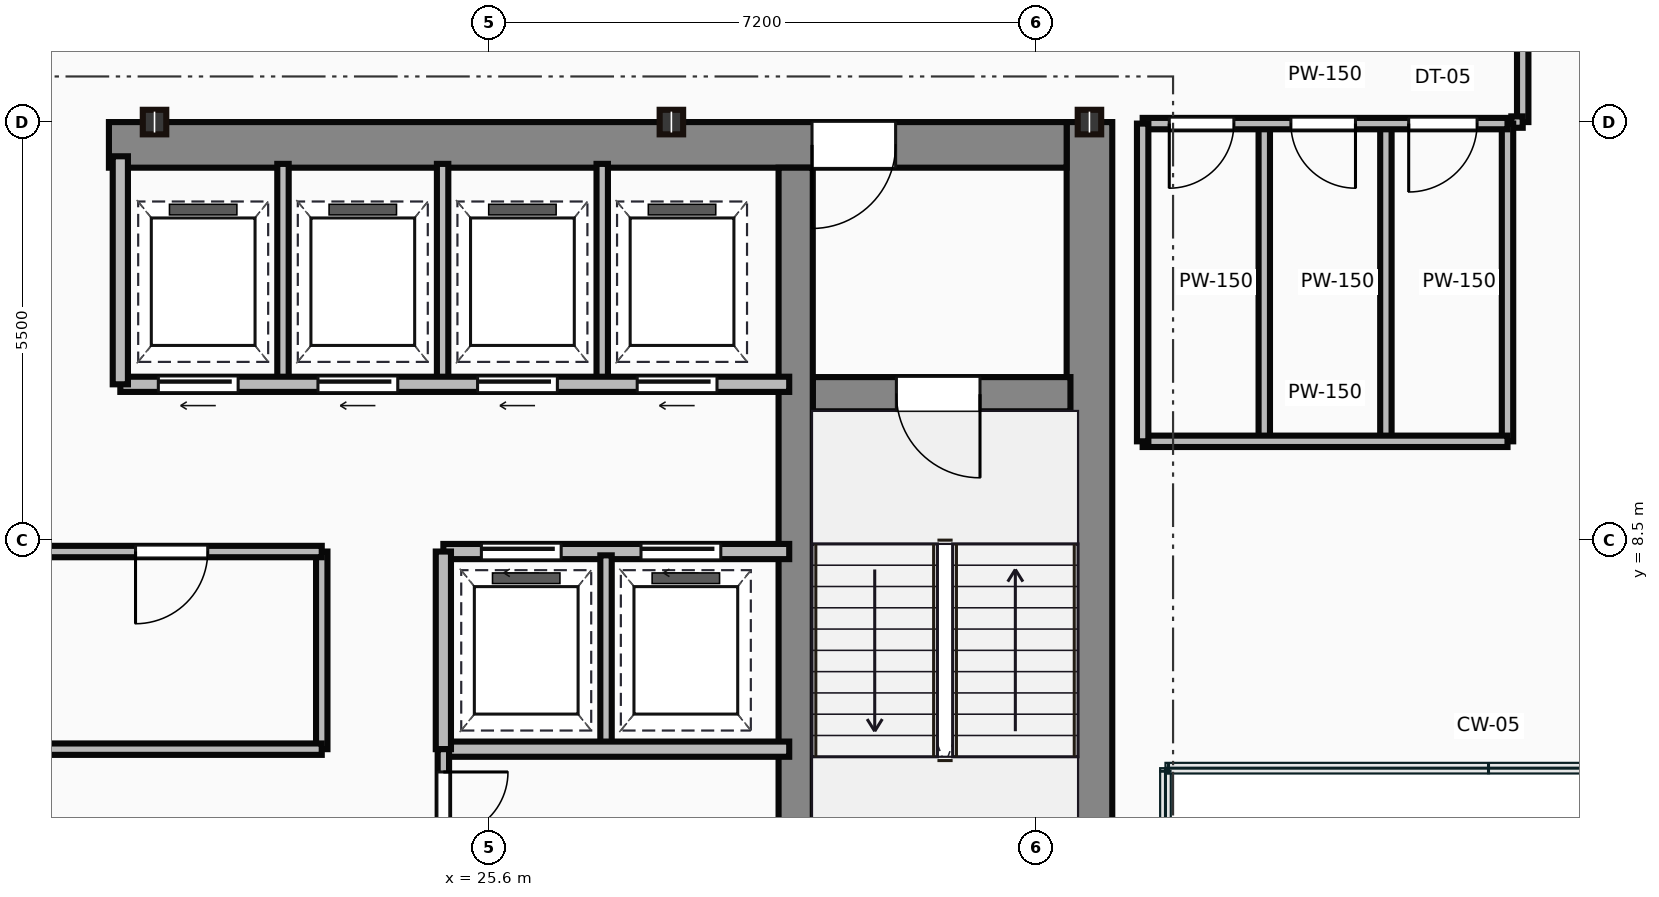
"""IFC4 building model, lengths in metres.
Left out: names, types, materials, properties, quantities, classifications, styles, units other than length and angle.
Written with IfcOpenShell. Run it as: python <this file> out.ifc"""

import sys

from ifc_helpers import new_model, si_unit, direction, frame, frame_2d, origin, origin_2d, place, context, subcontext, project, spatial, rectangle, i_section, extrude, source, transform, mapped, element, fill, save


model = new_model("IFC4")
c1 = context("Model", 3, precision=1e-05, world=origin(), true_north=direction((0.0, 1.0)))
c2 = subcontext(c1, "Body", "Model", "MODEL_VIEW")
j1 = project(units=[si_unit("LENGTHUNIT", "METRE"), si_unit("PLANEANGLEUNIT", "RADIAN")], contexts=[c1])
p1 = place(None, origin())
s1 = spatial("IfcSite", under=j1, at=p1, CompositionType="ELEMENT")
p2 = place(p1, origin())
s2 = spatial("IfcBuilding", under=s1, at=p2, CompositionType="ELEMENT")
p3 = place(p2, frame((0.0, 0.0, 228.75)))
s3 = spatial("IfcBuildingStorey", under=s2, at=p3, CompositionType="ELEMENT", Elevation=228.75)
m1 = source(origin(), c2, "Body", "SweptSolid", [
    extrude(rectangle(XDim=13.1, YDim=0.6, at=frame_2d((6.55, 0.0))), origin(), (0.0, 0.0, 1.0), 3.65),
])
p4 = place(p3, frame((33.5, 0.9, 0.0), z_axis=(0.0, 0.0, 1.0), x_axis=(0.0, 1.0, 0.0)))
e1 = element("IfcWall", 1, at=p4, inside=s3, PredefinedType="SHEAR", context=c2, shape_type="MappedRepresentation", body=[
    mapped(m1, transform((0.0, 0.0, 0.0))),
])
m2 = source(origin(), c2, "Body", "SweptSolid", [
    extrude(rectangle(XDim=12.6, YDim=0.6, at=frame_2d((6.3, 0.0))), origin(), (0.0, 0.0, 1.0), 3.65),
])
p5 = place(p3, frame((20.6, 13.7, 0.0), z_axis=(0.0, 0.0, 1.0), x_axis=(1.0, 0.0, 0.0)))
e2 = element("IfcWall", 2, at=p5, inside=s3, PredefinedType="SHEAR", context=c2, shape_type="MappedRepresentation", body=[
    mapped(m2, transform((0.0, 0.0, 0.0))),
])
p6 = place(p5, frame((9.25, 0.0, 0.0)))
e3 = element("IfcOpeningElement", 3, at=p6, cuts=e2, PredefinedType="OPENING", context=c2, shape_type="SweptSolid", body=[
    extrude(rectangle(XDim=1.1, YDim=2.15, at=frame_2d((0.55, 1.075))), frame((0.0, 0.31, 0.0), z_axis=(0.0, -1.0, 0.0), x_axis=(1.0, 0.0, 0.0)), (0.0, 0.0, 1.0), 0.62),
])
m3 = source(origin(), c2, "Body", "SweptSolid", [
    extrude(rectangle(XDim=12.5, YDim=0.45, at=frame_2d((6.25, 0.0))), origin(), (0.0, 0.0, 1.0), 3.65),
])
p7 = place(p3, frame((29.635, 0.9, 0.0), z_axis=(0.0, 0.0, 1.0), x_axis=(0.0, 1.0, 0.0)))
e4 = element("IfcWall", 4, at=p7, inside=s3, PredefinedType="SHEAR", context=c2, shape_type="MappedRepresentation", body=[
    mapped(m3, transform((0.0, 0.0, 0.0))),
])
m4 = source(origin(), c2, "Body", "SweptSolid", [
    extrude(rectangle(XDim=3.39, YDim=0.45, at=frame_2d((1.695, 0.0))), origin(), (0.0, 0.0, 1.0), 3.65),
])
p8 = place(p3, frame((29.86, 10.42, 0.0), z_axis=(0.0, 0.0, 1.0), x_axis=(1.0, 0.0, 0.0)))
e5 = element("IfcWall", 5, at=p8, inside=s3, PredefinedType="SHEAR", context=c2, shape_type="MappedRepresentation", body=[
    mapped(m4, transform((0.0, 0.0, 0.0))),
])
p9 = place(p8, frame((1.1, 0.0, 0.0)))
e6 = element("IfcOpeningElement", 6, at=p9, cuts=e5, PredefinedType="OPENING", context=c2, shape_type="SweptSolid", body=[
    extrude(rectangle(XDim=1.1, YDim=2.15, at=frame_2d((0.55, 1.075))), frame((0.0, 0.235, 0.0), z_axis=(0.0, -1.0, 0.0), x_axis=(1.0, 0.0, 0.0)), (0.0, 0.0, 1.0), 0.47),
])
m5 = source(origin(), c2, "Body", "SweptSolid", [
    extrude(i_section(OverallWidth=0.309, OverallDepth=0.323, WebThickness=0.014, FlangeThickness=0.023, at=origin_2d()), origin(), (0.0, 0.0, 1.0), 3.65),
])
for number, where, z_axis, x_axis in (
    (7, (21.2, 14.0, 0.0), (0.0, 0.0, 1.0), (1.0, 0.0, 0.0)),
    (8, (28.0, 14.0, 0.0), (0.0, 0.0, 1.0), (1.0, 0.0, 0.0)),
    (9, (33.5, 14.0, 0.0), (0.0, 0.0, 1.0), (1.0, 0.0, 0.0)),
):
    element("IfcColumn", number, at=place(p3, frame(where, z_axis=z_axis, x_axis=x_axis)), inside=s3, PredefinedType="COLUMN", context=c2, shape_type="MappedRepresentation", body=[
        mapped(m5, transform((0.0, 0.0, 0.0))),
    ])
m6 = source(origin(), c2, "Body", "SweptSolid", [
    extrude(rectangle(XDim=11.85, YDim=0.15, at=frame_2d((5.925, 0.0))), origin(), (0.0, 0.0, 1.0), 3.4),
])
p10 = place(p3, frame((11.55, 5.75, 0.0), z_axis=(0.0, 0.0, 1.0), x_axis=(1.0, 0.0, 0.0)))
e10 = element("IfcWall", 10, at=p10, inside=s3, PredefinedType="PARTITIONING", context=c2, shape_type="MappedRepresentation", body=[
    mapped(m6, transform((0.0, 0.0, 0.0))),
])
p11 = place(p3, frame((11.55, 8.35, 0.0), z_axis=(0.0, 0.0, 1.0), x_axis=(1.0, 0.0, 0.0)))
e11 = element("IfcWall", 11, at=p11, inside=s3, PredefinedType="PARTITIONING", context=c2, shape_type="MappedRepresentation", body=[
    mapped(m6, transform((0.0, 0.0, 0.0))),
])
p12 = place(p11, frame((1.1, 0.0, 0.0)))
e12 = element("IfcOpeningElement", 12, at=p12, cuts=e11, PredefinedType="OPENING", context=c2, shape_type="SweptSolid", body=[
    extrude(rectangle(XDim=0.95, YDim=2.15, at=frame_2d((0.475, 1.075))), frame((0.0, 0.085, 0.0), z_axis=(0.0, -1.0, 0.0), x_axis=(1.0, 0.0, 0.0)), (0.0, 0.0, 1.0), 0.17),
])
p13 = place(p11, frame((9.4, 0.0, 0.0)))
e13 = element("IfcOpeningElement", 13, at=p13, cuts=e11, PredefinedType="OPENING", context=c2, shape_type="SweptSolid", body=[
    extrude(rectangle(XDim=0.95, YDim=2.15, at=frame_2d((0.475, 1.075))), frame((0.0, 0.085, 0.0), z_axis=(0.0, -1.0, 0.0), x_axis=(1.0, 0.0, 0.0)), (0.0, 0.0, 1.0), 0.17),
])
m7 = source(origin(), c2, "Body", "SweptSolid", [
    extrude(rectangle(XDim=2.6, YDim=0.15, at=frame_2d((1.3, 0.0))), origin(), (0.0, 0.0, 1.0), 3.4),
])
p14 = place(p3, frame((23.4, 5.75, 0.0), z_axis=(0.0, 0.0, 1.0), x_axis=(0.0, 1.0, 0.0)))
e14 = element("IfcWall", 14, at=p14, inside=s3, PredefinedType="PARTITIONING", context=c2, shape_type="MappedRepresentation", body=[
    mapped(m7, transform((0.0, 0.0, 0.0))),
])
m8 = source(origin(), c2, "Body", "SweptSolid", [
    extrude(rectangle(XDim=8.8, YDim=0.2, at=frame_2d((4.4, 0.0))), origin(), (0.0, 0.0, 1.0), 3.4),
])
p15 = place(p3, frame((20.75, 10.55, 0.0), z_axis=(0.0, 0.0, 1.0), x_axis=(1.0, 0.0, 0.0)))
e15 = element("IfcWall", 15, at=p15, inside=s3, PredefinedType="PARTITIONING", context=c2, shape_type="MappedRepresentation", body=[
    mapped(m8, transform((0.0, 0.0, 0.0))),
])
p16 = place(p15, frame((0.5, 0.0, 0.0)))
e16 = element("IfcOpeningElement", 16, at=p16, cuts=e15, PredefinedType="OPENING", context=c2, shape_type="SweptSolid", body=[
    extrude(rectangle(XDim=1.05, YDim=2.15, at=frame_2d((0.525, 1.075))), frame((0.0, 0.11, 0.0), z_axis=(0.0, -1.0, 0.0), x_axis=(1.0, 0.0, 0.0)), (0.0, 0.0, 1.0), 0.22),
])
p17 = place(p15, frame((2.6, 0.0, 0.0)))
e17 = element("IfcOpeningElement", 17, at=p17, cuts=e15, PredefinedType="OPENING", context=c2, shape_type="SweptSolid", body=[
    extrude(rectangle(XDim=1.05, YDim=2.15, at=frame_2d((0.525, 1.075))), frame((0.0, 0.11, 0.0), z_axis=(0.0, -1.0, 0.0), x_axis=(1.0, 0.0, 0.0)), (0.0, 0.0, 1.0), 0.22),
])
p18 = place(p15, frame((4.7, 0.0, 0.0)))
e18 = element("IfcOpeningElement", 18, at=p18, cuts=e15, PredefinedType="OPENING", context=c2, shape_type="SweptSolid", body=[
    extrude(rectangle(XDim=1.05, YDim=2.15, at=frame_2d((0.525, 1.075))), frame((0.0, 0.11, 0.0), z_axis=(0.0, -1.0, 0.0), x_axis=(1.0, 0.0, 0.0)), (0.0, 0.0, 1.0), 0.22),
])
p19 = place(p15, frame((6.8, 0.0, 0.0)))
e19 = element("IfcOpeningElement", 19, at=p19, cuts=e15, PredefinedType="OPENING", context=c2, shape_type="SweptSolid", body=[
    extrude(rectangle(XDim=1.05, YDim=2.15, at=frame_2d((0.525, 1.075))), frame((0.0, 0.11, 0.0), z_axis=(0.0, -1.0, 0.0), x_axis=(1.0, 0.0, 0.0)), (0.0, 0.0, 1.0), 0.22),
])
m9 = source(origin(), c2, "Body", "SweptSolid", [
    extrude(rectangle(XDim=3.0, YDim=0.2, at=frame_2d((1.5, 0.0))), origin(), (0.0, 0.0, 1.0), 3.4),
])
p20 = place(p3, frame((20.75, 10.55, 0.0), z_axis=(0.0, 0.0, 1.0), x_axis=(0.0, 1.0, 0.0)))
e20 = element("IfcWall", 20, at=p20, inside=s3, PredefinedType="PARTITIONING", context=c2, shape_type="MappedRepresentation", body=[
    mapped(m9, transform((0.0, 0.0, 0.0))),
])
m10 = source(origin(), c2, "Body", "SweptSolid", [
    extrude(rectangle(XDim=2.85, YDim=0.15, at=frame_2d((1.425, 0.0))), origin(), (0.0, 0.0, 1.0), 3.4),
])
for number, where, z_axis, x_axis in (
    (21, (22.89, 10.6, 0.0), (0.0, 0.0, 1.0), (0.0, 1.0, 0.0)),
    (22, (24.99, 10.6, 0.0), (0.0, 0.0, 1.0), (0.0, 1.0, 0.0)),
    (23, (27.09, 10.6, 0.0), (0.0, 0.0, 1.0), (0.0, 1.0, 0.0)),
):
    element("IfcWall", number, at=place(p3, frame(where, z_axis=z_axis, x_axis=x_axis)), inside=s3, PredefinedType="PARTITIONING", context=c2, shape_type="MappedRepresentation", body=[
        mapped(m10, transform((0.0, 0.0, 0.0))),
    ])
m11 = source(origin(), c2, "Body", "SweptSolid", [
    extrude(rectangle(XDim=4.55, YDim=0.2, at=frame_2d((2.275, 0.0))), origin(), (0.0, 0.0, 1.0), 3.4),
])
p21 = place(p3, frame((25.0, 8.35, 0.0), z_axis=(0.0, 0.0, 1.0), x_axis=(1.0, 0.0, 0.0)))
e24 = element("IfcWall", 24, at=p21, inside=s3, PredefinedType="PARTITIONING", context=c2, shape_type="MappedRepresentation", body=[
    mapped(m11, transform((0.0, 0.0, 0.0))),
])
p22 = place(p21, frame((0.5, 0.0, 0.0)))
e25 = element("IfcOpeningElement", 25, at=p22, cuts=e24, PredefinedType="OPENING", context=c2, shape_type="SweptSolid", body=[
    extrude(rectangle(XDim=1.05, YDim=2.15, at=frame_2d((0.525, 1.075))), frame((0.0, 0.11, 0.0), z_axis=(0.0, -1.0, 0.0), x_axis=(1.0, 0.0, 0.0)), (0.0, 0.0, 1.0), 0.22),
])
p23 = place(p21, frame((2.6, 0.0, 0.0)))
e26 = element("IfcOpeningElement", 26, at=p23, cuts=e24, PredefinedType="OPENING", context=c2, shape_type="SweptSolid", body=[
    extrude(rectangle(XDim=1.05, YDim=2.15, at=frame_2d((0.525, 1.075))), frame((0.0, 0.11, 0.0), z_axis=(0.0, -1.0, 0.0), x_axis=(1.0, 0.0, 0.0)), (0.0, 0.0, 1.0), 0.22),
])
p24 = place(p3, frame((25.0, 5.75, 0.0), z_axis=(0.0, 0.0, 1.0), x_axis=(1.0, 0.0, 0.0)))
e27 = element("IfcWall", 27, at=p24, inside=s3, PredefinedType="PARTITIONING", context=c2, shape_type="MappedRepresentation", body=[
    mapped(m11, transform((0.0, 0.0, 0.0))),
])
m12 = source(origin(), c2, "Body", "SweptSolid", [
    extrude(rectangle(XDim=2.6, YDim=0.2, at=frame_2d((1.3, 0.0))), origin(), (0.0, 0.0, 1.0), 3.4),
])
p25 = place(p3, frame((25.0, 5.75, 0.0), z_axis=(0.0, 0.0, 1.0), x_axis=(0.0, 1.0, 0.0)))
e28 = element("IfcWall", 28, at=p25, inside=s3, PredefinedType="PARTITIONING", context=c2, shape_type="MappedRepresentation", body=[
    mapped(m12, transform((0.0, 0.0, 0.0))),
])
m13 = source(origin(), c2, "Body", "SweptSolid", [
    extrude(rectangle(XDim=2.5, YDim=0.15, at=frame_2d((1.25, 0.0))), origin(), (0.0, 0.0, 1.0), 3.4),
])
p26 = place(p3, frame((27.14, 5.8, 0.0), z_axis=(0.0, 0.0, 1.0), x_axis=(0.0, 1.0, 0.0)))
e29 = element("IfcWall", 29, at=p26, inside=s3, PredefinedType="PARTITIONING", context=c2, shape_type="MappedRepresentation", body=[
    mapped(m13, transform((0.0, 0.0, 0.0))),
])
m14 = source(origin(), c2, "Body", "SweptSolid", [
    extrude(rectangle(XDim=4.9, YDim=0.15, at=frame_2d((2.45, 0.0))), origin(), (0.0, 0.0, 1.0), 3.4),
])
p27 = place(p3, frame((25.0, 0.85, 0.0), z_axis=(0.0, 0.0, 1.0), x_axis=(0.0, 1.0, 0.0)))
e30 = element("IfcWall", 30, at=p27, inside=s3, PredefinedType="PARTITIONING", context=c2, shape_type="MappedRepresentation", body=[
    mapped(m14, transform((0.0, 0.0, 0.0))),
])
p28 = place(p27, frame((2.0, 0.0, 0.0)))
e31 = element("IfcOpeningElement", 31, at=p28, cuts=e30, PredefinedType="OPENING", context=c2, shape_type="SweptSolid", body=[
    extrude(rectangle(XDim=0.95, YDim=2.15, at=frame_2d((0.475, 1.075))), frame((0.0, 0.085, 0.0), z_axis=(0.0, -1.0, 0.0), x_axis=(1.0, 0.0, 0.0)), (0.0, 0.0, 1.0), 0.17),
])
p29 = place(p27, frame((3.75, 0.0, 0.0)))
e32 = element("IfcOpeningElement", 32, at=p29, cuts=e30, PredefinedType="OPENING", context=c2, shape_type="SweptSolid", body=[
    extrude(rectangle(XDim=0.85, YDim=2.15, at=frame_2d((0.425, 1.075))), frame((0.0, 0.085, 0.0), z_axis=(0.0, -1.0, 0.0), x_axis=(1.0, 0.0, 0.0)), (0.0, 0.0, 1.0), 0.17),
])
m15 = source(origin(), c2, "Body", "SweptSolid", [
    extrude(rectangle(XDim=4.8, YDim=0.15, at=frame_2d((2.4, 0.0))), origin(), (0.0, 0.0, 1.0), 2.787),
])
p30 = place(p3, frame((34.2, 13.98, 0.0), z_axis=(0.0, 0.0, 1.0), x_axis=(1.0, 0.0, 0.0)))
e33 = element("IfcWall", 33, at=p30, inside=s3, PredefinedType="PARTITIONING", context=c2, shape_type="MappedRepresentation", body=[
    mapped(m15, transform((0.0, 0.0, 0.0))),
])
p31 = place(p30, frame((0.35, 0.0, 0.0)))
e34 = element("IfcOpeningElement", 34, at=p31, cuts=e33, PredefinedType="OPENING", context=c2, shape_type="SweptSolid", body=[
    extrude(rectangle(XDim=0.85, YDim=2.1, at=frame_2d((0.425, 1.05))), frame((0.0, 0.085, 0.0), z_axis=(0.0, -1.0, 0.0), x_axis=(1.0, 0.0, 0.0)), (0.0, 0.0, 1.0), 0.17),
])
p32 = place(p30, frame((1.95, 0.0, 0.0)))
e35 = element("IfcOpeningElement", 35, at=p32, cuts=e33, PredefinedType="OPENING", context=c2, shape_type="SweptSolid", body=[
    extrude(rectangle(XDim=0.85, YDim=2.1, at=frame_2d((0.425, 1.05))), frame((0.0, 0.085, 0.0), z_axis=(0.0, -1.0, 0.0), x_axis=(1.0, 0.0, 0.0)), (0.0, 0.0, 1.0), 0.17),
])
p33 = place(p30, frame((3.5, 0.0, 0.0)))
e36 = element("IfcOpeningElement", 36, at=p33, cuts=e33, PredefinedType="OPENING", context=c2, shape_type="SweptSolid", body=[
    extrude(rectangle(XDim=0.9, YDim=2.1, at=frame_2d((0.45, 1.05))), frame((0.0, 0.085, 0.0), z_axis=(0.0, -1.0, 0.0), x_axis=(1.0, 0.0, 0.0)), (0.0, 0.0, 1.0), 0.17),
])
m16 = source(origin(), c2, "Body", "SweptSolid", [
    extrude(rectangle(XDim=4.8, YDim=0.15, at=frame_2d((2.4, 0.0))), origin(), (0.0, 0.0, 1.0), 3.4),
])
p34 = place(p3, frame((34.2, 9.8, 0.0), z_axis=(0.0, 0.0, 1.0), x_axis=(1.0, 0.0, 0.0)))
e37 = element("IfcWall", 37, at=p34, inside=s3, PredefinedType="PARTITIONING", context=c2, shape_type="MappedRepresentation", body=[
    mapped(m16, transform((0.0, 0.0, 0.0))),
])
m17 = source(origin(), c2, "Body", "SweptSolid", [
    extrude(rectangle(XDim=4.18, YDim=0.15, at=frame_2d((2.09, 0.0))), origin(), (0.0, 0.0, 1.0), 3.4),
])
for number, where, z_axis, x_axis in (
    (38, (39.0, 9.8, 0.0), (0.0, 0.0, 1.0), (0.0, 1.0, 0.0)),
    (39, (34.2, 9.8, 0.0), (0.0, 0.0, 1.0), (0.0, 1.0, 0.0)),
    (40, (35.8, 9.8, 0.0), (0.0, 0.0, 1.0), (0.0, 1.0, 0.0)),
    (41, (37.4, 9.8, 0.0), (0.0, 0.0, 1.0), (0.0, 1.0, 0.0)),
):
    element("IfcWall", number, at=place(p3, frame(where, z_axis=z_axis, x_axis=x_axis)), inside=s3, PredefinedType="PARTITIONING", context=c2, shape_type="MappedRepresentation", body=[
        mapped(m17, transform((0.0, 0.0, 0.0))),
    ])
m18 = source(origin(), c2, "Body", "SweptSolid", [
    extrude(rectangle(XDim=2.2, YDim=0.15, at=frame_2d((1.1, 0.0))), origin(), (0.0, 0.0, 1.0), 3.4),
])
p35 = place(p3, frame((39.2, 16.2, 0.0), z_axis=(0.0, 0.0, 1.0), x_axis=(0.0, -1.0, 0.0)))
e42 = element("IfcWall", 42, at=p35, inside=s3, PredefinedType="PARTITIONING", context=c2, shape_type="MappedRepresentation", body=[
    mapped(m18, transform((0.0, 0.0, 0.0))),
])
m19 = source(origin(), c2, "Body", "SweptSolid", [
    extrude(rectangle(XDim=0.15, YDim=0.15, at=frame_2d((0.075, 0.0))), origin(), (0.0, 0.0, 1.0), 3.4),
])
p36 = place(p3, frame((39.2, 14.0, 0.0), z_axis=(0.0, 0.0, 1.0), x_axis=(-1.0, 0.0, 0.0)))
e43 = element("IfcWall", 43, at=p36, inside=s3, PredefinedType="PARTITIONING", context=c2, shape_type="MappedRepresentation", body=[
    mapped(m19, transform((0.0, 0.0, 0.0))),
])
m20 = source(origin(), c2, "Body", "SweptSolid", [
    extrude(rectangle(XDim=1.1, YDim=2.15, at=frame_2d((0.55, 1.075))), frame((0.0, 0.025, 0.0), z_axis=(0.0, -1.0, 0.0), x_axis=(1.0, 0.0, 0.0)), (0.0, 0.0, 1.0), 0.05),
])
p37 = place(p9, frame((1.1, 0.0, 0.0), z_axis=(0.0, 0.0, 1.0), x_axis=(-1.0, 0.0, 0.0)))
e44 = element("IfcDoor", 44, at=p37, inside=s3, OperationType="SINGLE_SWING_RIGHT", PredefinedType="DOOR", context=c2, shape_type="MappedRepresentation", body=[
    mapped(m20, transform((0.0, 0.0, 0.0))),
])
fill(e6, e44)
p38 = place(p6, origin())
e45 = element("IfcDoor", 45, at=p38, inside=s3, OperationType="SINGLE_SWING_LEFT", PredefinedType="DOOR", context=c2, shape_type="MappedRepresentation", body=[
    mapped(m20, transform((0.0, 0.0, 0.0))),
])
fill(e3, e45)
m21 = source(origin(), c2, "Body", "SweptSolid", [
    extrude(rectangle(XDim=0.95, YDim=2.15, at=frame_2d((0.475, 1.075))), frame((0.0, 0.025, 0.0), z_axis=(0.0, -1.0, 0.0), x_axis=(1.0, 0.0, 0.0)), (0.0, 0.0, 1.0), 0.05),
])
p39 = place(p13, origin())
e46 = element("IfcDoor", 46, at=p39, inside=s3, OperationType="SINGLE_SWING_LEFT", PredefinedType="DOOR", context=c2, shape_type="MappedRepresentation", body=[
    mapped(m21, transform((0.0, 0.0, 0.0))),
])
fill(e13, e46)
m22 = source(origin(), c2, "Body", "SweptSolid", [
    extrude(rectangle(XDim=1.05, YDim=2.15, at=frame_2d((0.525, 1.075))), frame((0.0, 0.025, 0.0), z_axis=(0.0, -1.0, 0.0), x_axis=(1.0, 0.0, 0.0)), (0.0, 0.0, 1.0), 0.05),
])
p40 = place(p16, frame((1.05, 0.0, 0.0), z_axis=(0.0, 0.0, 1.0), x_axis=(-1.0, 0.0, 0.0)))
e47 = element("IfcDoor", 47, at=p40, inside=s3, OperationType="SLIDING_TO_LEFT", PredefinedType="DOOR", context=c2, shape_type="MappedRepresentation", body=[
    mapped(m22, transform((0.0, 0.0, 0.0))),
])
fill(e16, e47)
p41 = place(p17, frame((1.05, 0.0, 0.0), z_axis=(0.0, 0.0, 1.0), x_axis=(-1.0, 0.0, 0.0)))
e48 = element("IfcDoor", 48, at=p41, inside=s3, OperationType="SLIDING_TO_LEFT", PredefinedType="DOOR", context=c2, shape_type="MappedRepresentation", body=[
    mapped(m22, transform((0.0, 0.0, 0.0))),
])
fill(e17, e48)
p42 = place(p18, frame((1.05, 0.0, 0.0), z_axis=(0.0, 0.0, 1.0), x_axis=(-1.0, 0.0, 0.0)))
e49 = element("IfcDoor", 49, at=p42, inside=s3, OperationType="SLIDING_TO_LEFT", PredefinedType="DOOR", context=c2, shape_type="MappedRepresentation", body=[
    mapped(m22, transform((0.0, 0.0, 0.0))),
])
fill(e18, e49)
p43 = place(p19, frame((1.05, 0.0, 0.0), z_axis=(0.0, 0.0, 1.0), x_axis=(-1.0, 0.0, 0.0)))
e50 = element("IfcDoor", 50, at=p43, inside=s3, OperationType="SLIDING_TO_LEFT", PredefinedType="DOOR", context=c2, shape_type="MappedRepresentation", body=[
    mapped(m22, transform((0.0, 0.0, 0.0))),
])
fill(e19, e50)
p44 = place(p22, origin())
e51 = element("IfcDoor", 51, at=p44, inside=s3, OperationType="SLIDING_TO_LEFT", PredefinedType="DOOR", context=c2, shape_type="MappedRepresentation", body=[
    mapped(m22, transform((0.0, 0.0, 0.0))),
])
fill(e25, e51)
p45 = place(p23, origin())
e52 = element("IfcDoor", 52, at=p45, inside=s3, OperationType="SLIDING_TO_LEFT", PredefinedType="DOOR", context=c2, shape_type="MappedRepresentation", body=[
    mapped(m22, transform((0.0, 0.0, 0.0))),
])
fill(e26, e52)
m23 = source(origin(), c2, "Body", "SweptSolid", [
    extrude(rectangle(XDim=0.85, YDim=2.15, at=frame_2d((0.425, 1.075))), frame((0.0, 0.025, 0.0), z_axis=(0.0, -1.0, 0.0), x_axis=(1.0, 0.0, 0.0)), (0.0, 0.0, 1.0), 0.05),
])
p46 = place(p29, origin())
e53 = element("IfcDoor", 53, at=p46, inside=s3, OperationType="SINGLE_SWING_RIGHT", PredefinedType="DOOR", context=c2, shape_type="MappedRepresentation", body=[
    mapped(m23, transform((0.0, 0.0, 0.0))),
])
fill(e32, e53)
m24 = source(origin(), c2, "Body", "SweptSolid", [
    extrude(rectangle(XDim=0.85, YDim=2.1, at=frame_2d((0.425, 1.05))), frame((0.0, 0.025, 0.0), z_axis=(0.0, -1.0, 0.0), x_axis=(1.0, 0.0, 0.0)), (0.0, 0.0, 1.0), 0.05),
])
p47 = place(p31, frame((0.85, 0.0, 0.0), z_axis=(0.0, 0.0, 1.0), x_axis=(-1.0, 0.0, 0.0)))
e54 = element("IfcDoor", 54, at=p47, inside=s3, OperationType="SINGLE_SWING_LEFT", PredefinedType="DOOR", context=c2, shape_type="MappedRepresentation", body=[
    mapped(m24, transform((0.0, 0.0, 0.0))),
])
fill(e34, e54)
p48 = place(p32, frame((0.85, 0.0, 0.0), z_axis=(0.0, 0.0, 1.0), x_axis=(-1.0, 0.0, 0.0)))
e55 = element("IfcDoor", 55, at=p48, inside=s3, OperationType="SINGLE_SWING_RIGHT", PredefinedType="DOOR", context=c2, shape_type="MappedRepresentation", body=[
    mapped(m24, transform((0.0, 0.0, 0.0))),
])
fill(e35, e55)
m25 = source(origin(), c2, "Body", "SweptSolid", [
    extrude(rectangle(XDim=0.9, YDim=2.1, at=frame_2d((0.45, 1.05))), frame((0.0, 0.025, 0.0), z_axis=(0.0, -1.0, 0.0), x_axis=(1.0, 0.0, 0.0)), (0.0, 0.0, 1.0), 0.05),
])
p49 = place(p33, frame((0.9, 0.0, 0.0), z_axis=(0.0, 0.0, 1.0), x_axis=(-1.0, 0.0, 0.0)))
e56 = element("IfcDoor", 56, at=p49, inside=s3, OperationType="SINGLE_SWING_LEFT", PredefinedType="DOOR", context=c2, shape_type="MappedRepresentation", body=[
    mapped(m25, transform((0.0, 0.0, 0.0))),
])
fill(e36, e56)
save(model, sys.argv[1])
